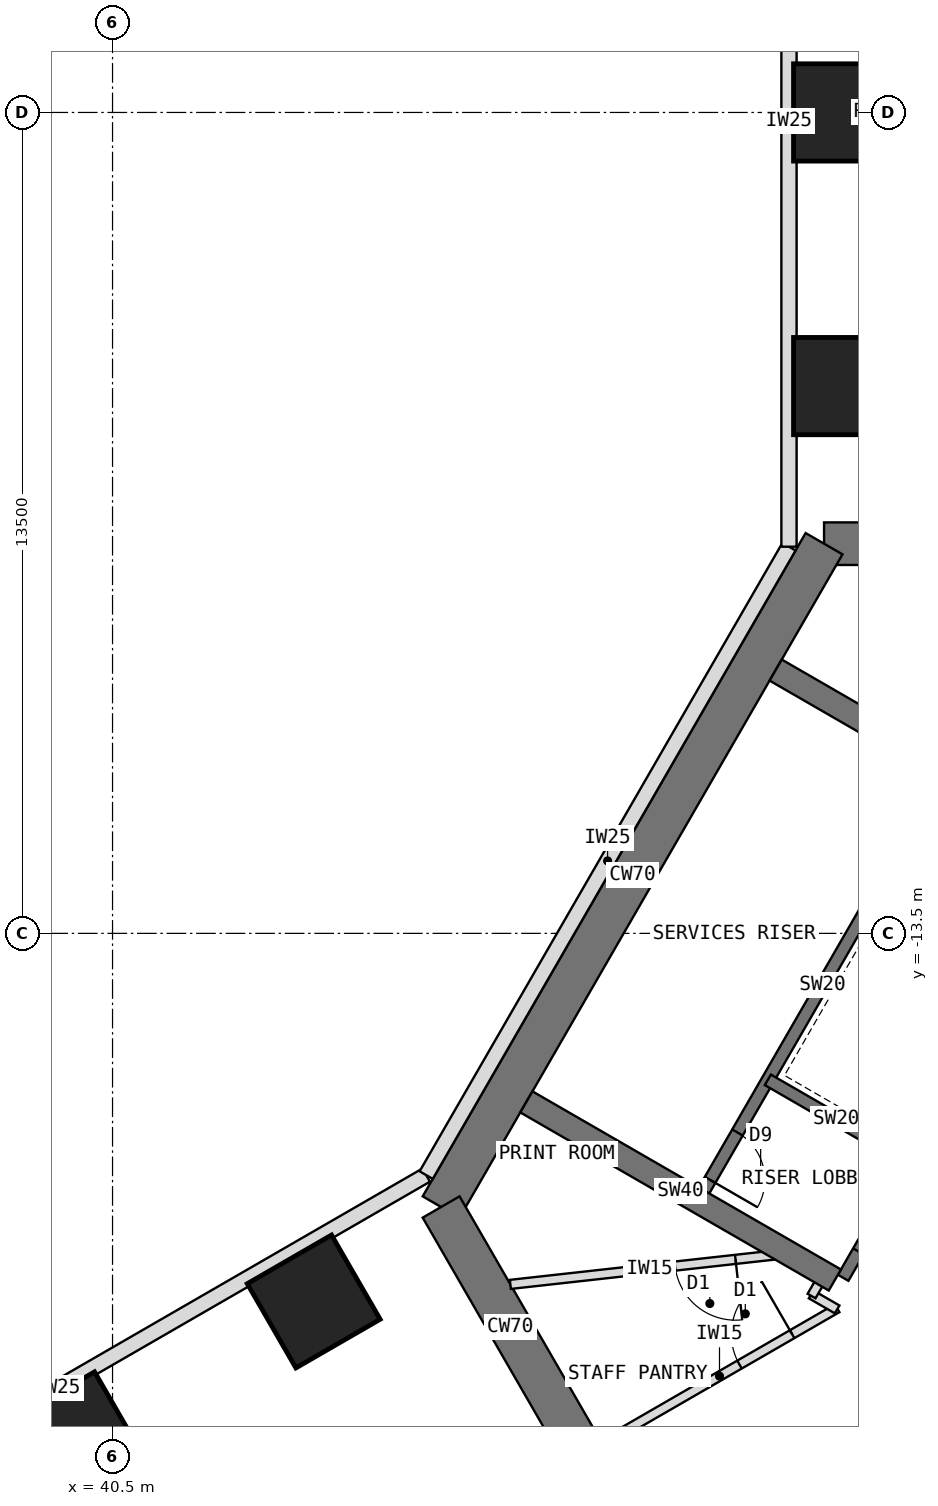
"""IFC4 building model, lengths in metres.
Left out: names, types, materials, properties, quantities, classifications, styles, units other than length and angle.
Written with IfcOpenShell. Run it as: python <this file> out.ifc"""

import sys

from ifc_helpers import new_model, si_unit, direction, frame, frame_2d, origin, origin_2d, place, context, subcontext, project, spatial, rectangle, extrude, element, fill, save


model = new_model("IFC4")
c1 = context("Model", 3, precision=1e-05, world=origin(), true_north=direction((0.0, 1.0)))
c2 = subcontext(c1, "Body", "Model", "MODEL_VIEW")
j1 = project(units=[si_unit("LENGTHUNIT", "METRE"), si_unit("PLANEANGLEUNIT", "RADIAN")], contexts=[c1])
p1 = place(None, origin())
s1 = spatial("IfcSite", under=j1, at=p1, CompositionType="ELEMENT")
p2 = place(p1, origin())
s2 = spatial("IfcBuilding", under=s1, at=p2, CompositionType="ELEMENT")
p3 = place(p2, frame((0.0, 0.0, 15.5)))
s3 = spatial("IfcBuildingStorey", under=s2, at=p3, CompositionType="ELEMENT", Elevation=15.5)
for number, where, z_axis, x_axis in (
    (1, (40.5, -13.5, 0.0), (0.0, 0.0, 1.0), (1.0, 0.0, 0.0)),
    (2, (40.5, 0.0, 0.0), (0.0, 0.0, 1.0), (1.0, 0.0, 0.0)),
):
    element("IfcColumn", number, at=place(p3, frame(where, z_axis=z_axis, x_axis=x_axis)), inside=s3, PredefinedType="COLUMN", context=c2, shape_type="SweptSolid", body=[
        extrude(rectangle(XDim=1.5, YDim=1.5, at=origin_2d()), origin(), (0.0, 0.0, 1.0), 5.0),
    ])
p4 = place(p3, frame((56.75, -7.092, 0.0), z_axis=(0.0, 0.0, 1.0), x_axis=(-1.0, 0.0, 0.0)))
e3 = element("IfcWall", 3, at=p4, inside=s3, PredefinedType="SHEAR", context=c2, shape_type="SweptSolid", body=[
    extrude(rectangle(XDim=4.548, YDim=0.7, at=frame_2d((2.274, 0.0))), origin(), (0.0, 0.0, 1.0), 5.0),
])
p5 = place(p3, frame((52.202, -7.092, 0.0), z_axis=(0.0, 0.0, 1.0), x_axis=(-0.500005998175, -0.866021940709, 0.0)))
e4 = element("IfcWall", 4, at=p5, inside=s3, PredefinedType="SHEAR", context=c2, shape_type="SweptSolid", body=[
    extrude(rectangle(XDim=12.596, YDim=0.7, at=frame_2d((6.298, 0.0))), origin(), (0.0, 0.0, 1.0), 5.0),
])
p6 = place(p3, frame((45.904, -18.0, 0.0), z_axis=(0.0, 0.0, 1.0), x_axis=(0.500024481964, -0.866011268655, 0.0)))
e5 = element("IfcWall", 5, at=p6, inside=s3, PredefinedType="SHEAR", context=c2, shape_type="SweptSolid", body=[
    extrude(rectangle(XDim=4.548, YDim=0.7, at=frame_2d((2.274, 0.0))), origin(), (0.0, 0.0, 1.0), 5.0),
])
for number, where, z_axis, x_axis in (
    (6, (52.5, -4.5, 0.0), (0.0, 0.0, 1.0), (1.0, 0.0, 0.0)),
    (7, (52.5, 0.0, 0.0), (0.0, 0.0, 1.0), (1.0, 0.0, 0.0)),
    (8, (43.809, -19.554, 0.0), (0.0, 0.0, 1.0), (0.866, 0.5, 0.0)),
    (9, (39.912, -21.804, 0.0), (0.0, 0.0, 1.0), (0.866, 0.5, 0.0)),
):
    element("IfcColumn", number, at=place(p3, frame(where, z_axis=z_axis, x_axis=x_axis)), inside=s3, PredefinedType="COLUMN", context=c2, shape_type="SweptSolid", body=[
        extrude(rectangle(XDim=1.6, YDim=1.6, at=origin_2d()), origin(), (0.0, 0.0, 1.0), 5.0),
    ])
p7 = place(p3, frame((56.516, -12.236, 0.0), z_axis=(0.0, 0.0, 1.0), x_axis=(-0.49999894854, -0.866026010844, 0.0)))
e10 = element("IfcWall", 10, at=p7, inside=s3, PredefinedType="SHEAR", context=c2, shape_type="SweptSolid", body=[
    extrude(rectangle(XDim=8.0, YDim=0.2, at=frame_2d((4.0, 0.0))), origin(), (0.0, 0.0, 1.0), 5.0),
])
p8 = place(p7, frame((6.3, 0.0, 0.0)))
e11 = element("IfcOpeningElement", 11, at=p8, cuts=e10, PredefinedType="OPENING", context=c2, shape_type="SweptSolid", body=[
    extrude(rectangle(XDim=1.2, YDim=2.1, at=frame_2d((0.6, 1.05))), frame((0.0, 0.11, 0.0), z_axis=(0.0, -1.0, 0.0), x_axis=(1.0, 0.0, 0.0)), (0.0, 0.0, 1.0), 0.22),
])
for number, where, z_axis, x_axis in (
    (12, (54.98, -14.697, 0.0), (0.0, 0.0, 1.0), (-0.866, 0.5, 0.0)),
    (13, (53.53, -17.209, 0.0), (0.0, 0.0, 1.0), (-0.866, 0.5, 0.0)),
):
    element("IfcWall", number, at=place(p3, frame(where, z_axis=z_axis, x_axis=x_axis)), inside=s3, PredefinedType="SHEAR", context=c2, shape_type="SweptSolid", body=[
        extrude(rectangle(XDim=2.6, YDim=0.2, at=frame_2d((1.3, 0.0))), origin(), (0.0, 0.0, 1.0), 5.0),
    ])
p9 = place(p3, frame((54.178, -10.886, 0.0), z_axis=(0.0, 0.0, 1.0), x_axis=(-0.49999894854, -0.866026010844, 0.0)))
e14 = element("IfcWall", 14, at=p9, inside=s3, PredefinedType="SHEAR", context=c2, shape_type="SweptSolid", body=[
    extrude(rectangle(XDim=8.0, YDim=0.2, at=frame_2d((4.0, 0.0))), origin(), (0.0, 0.0, 1.0), 5.0),
])
p10 = place(p9, frame((6.8, 0.0, 0.0)))
e15 = element("IfcOpeningElement", 15, at=p10, cuts=e14, PredefinedType="OPENING", context=c2, shape_type="SweptSolid", body=[
    extrude(rectangle(XDim=0.9, YDim=2.1, at=frame_2d((0.45, 1.05))), frame((0.0, 0.11, 0.0), z_axis=(0.0, -1.0, 0.0), x_axis=(1.0, 0.0, 0.0)), (0.0, 0.0, 1.0), 0.22),
])
for number, where, z_axis, x_axis in (
    (16, (52.38, -19.201, 0.0), (0.0, 0.0, 1.0), (-0.866, 0.5, 0.0)),
    (17, (56.48, -12.099, 0.0), (0.0, 0.0, 1.0), (-0.866, 0.5, 0.0)),
):
    element("IfcWall", number, at=place(p3, frame(where, z_axis=z_axis, x_axis=x_axis)), inside=s3, PredefinedType="SHEAR", context=c2, shape_type="SweptSolid", body=[
        extrude(rectangle(XDim=5.858, YDim=0.4, at=frame_2d((2.929, 0.0))), origin(), (0.0, 0.0, 1.0), 5.0),
    ])
p11 = place(p3, frame((48.548, -21.898, 0.0), z_axis=(0.0, 0.0, 1.0), x_axis=(0.866025445582, 0.499999927604, 0.0)))
e18 = element("IfcWall", 18, at=p11, inside=s3, PredefinedType="PARTITIONING", context=c2, shape_type="SweptSolid", body=[
    extrude(rectangle(XDim=4.468, YDim=0.15, at=frame_2d((2.234, 0.0))), origin(), (0.0, 0.0, 1.0), 4.8),
])
p12 = place(p11, frame((2.614, 0.0, 0.0)))
e19 = element("IfcOpeningElement", 19, at=p12, cuts=e18, PredefinedType="OPENING", context=c2, shape_type="SweptSolid", body=[
    extrude(rectangle(XDim=1.0, YDim=2.1, at=frame_2d((0.5, 1.05))), frame((0.0, 0.085, 0.0), z_axis=(0.0, -1.0, 0.0), x_axis=(1.0, 0.0, 0.0)), (0.0, 0.0, 1.0), 0.17),
])
p13 = place(p3, frame((52.417, -19.684, 0.0), z_axis=(0.0, 0.0, 1.0), x_axis=(-0.865831790172, 0.50033519877, 0.0)))
e20 = element("IfcWall", 20, at=p13, inside=s3, PredefinedType="PARTITIONING", context=c2, shape_type="SweptSolid", body=[
    extrude(rectangle(XDim=0.494, YDim=0.15, at=frame_2d((0.247, 0.0))), origin(), (0.0, 0.0, 1.0), 4.8),
])
p14 = place(p3, frame((51.997, -19.464, 0.0), z_axis=(0.0, 0.0, 1.0), x_axis=(0.499804398801, 0.866138304741, 0.0)))
e21 = element("IfcWall", 21, at=p14, inside=s3, PredefinedType="PARTITIONING", context=c2, shape_type="SweptSolid", body=[
    extrude(rectangle(XDim=0.43, YDim=0.15, at=frame_2d((0.215, 0.0))), origin(), (0.0, 0.0, 1.0), 4.8),
])
p15 = place(p3, frame((51.623, -18.764, 0.0), z_axis=(0.0, 0.0, 1.0), x_axis=(-0.993886318744, -0.110408266965, 0.0)))
e22 = element("IfcWall", 22, at=p15, inside=s3, PredefinedType="PARTITIONING", context=c2, shape_type="SweptSolid", body=[
    extrude(rectangle(XDim=4.608, YDim=0.15, at=frame_2d((2.304, 0.0))), origin(), (0.0, 0.0, 1.0), 4.8),
])
p16 = place(p15, frame((0.883, 0.0, 0.0)))
e23 = element("IfcOpeningElement", 23, at=p16, cuts=e22, PredefinedType="OPENING", context=c2, shape_type="SweptSolid", body=[
    extrude(rectangle(XDim=1.0, YDim=2.1, at=frame_2d((0.5, 1.05))), frame((0.0, 0.085, 0.0), z_axis=(0.0, -1.0, 0.0), x_axis=(1.0, 0.0, 0.0)), (0.0, 0.0, 1.0), 0.17),
])
p17 = place(p3, frame((40.5, -20.252, 0.0), z_axis=(0.0, 0.0, 1.0), x_axis=(0.0, 1.0, 0.0)))
e24 = element("IfcWall", 24, at=p17, inside=s3, PredefinedType="PARTITIONING", context=c2, shape_type="SweptSolid", body=[
    extrude(rectangle(XDim=6.752, YDim=0.2, at=frame_2d((3.376, 0.0))), origin(), (0.0, 0.0, 1.0), 4.65),
])
p18 = place(p17, frame((2.476, 0.0, 0.0)))
e25 = element("IfcOpeningElement", 25, at=p18, cuts=e24, PredefinedType="OPENING", context=c2, shape_type="SweptSolid", body=[
    extrude(rectangle(XDim=1.8, YDim=2.4, at=frame_2d((0.9, 1.2))), frame((0.0, 0.11, 0.0), z_axis=(0.0, -1.0, 0.0), x_axis=(1.0, 0.0, 0.0)), (0.0, 0.0, 1.0), 0.22),
])
p19 = place(p3, frame((27.0, -13.5, 0.0), z_axis=(0.0, 0.0, 1.0), x_axis=(1.0, 0.0, 0.0)))
e26 = element("IfcWall", 26, at=p19, inside=s3, PredefinedType="PARTITIONING", context=c2, shape_type="SweptSolid", body=[
    extrude(rectangle(XDim=13.5, YDim=0.2, at=frame_2d((6.75, 0.0))), origin(), (0.0, 0.0, 1.0), 3.25),
])
p20 = place(p19, frame((5.85, 0.0, 0.0)))
e27 = element("IfcOpeningElement", 27, at=p20, cuts=e26, PredefinedType="OPENING", context=c2, shape_type="SweptSolid", body=[
    extrude(rectangle(XDim=1.8, YDim=2.4, at=frame_2d((0.9, 1.2))), frame((0.0, 0.11, 0.0), z_axis=(0.0, -1.0, 0.0), x_axis=(1.0, 0.0, 0.0)), (0.0, 0.0, 1.0), 0.22),
])
p21 = place(p3, frame((40.5, -13.5, 0.0), z_axis=(0.0, 0.0, 1.0), x_axis=(0.0, 1.0, 0.0)))
e28 = element("IfcWall", 28, at=p21, inside=s3, PredefinedType="PARTITIONING", context=c2, shape_type="SweptSolid", body=[
    extrude(rectangle(XDim=13.5, YDim=0.2, at=frame_2d((6.75, 0.0))), origin(), (0.0, 0.0, 1.0), 3.25),
])
p22 = place(p21, frame((5.85, 0.0, 0.0)))
e29 = element("IfcOpeningElement", 29, at=p22, cuts=e28, PredefinedType="OPENING", context=c2, shape_type="SweptSolid", body=[
    extrude(rectangle(XDim=1.8, YDim=2.4, at=frame_2d((0.9, 1.2))), frame((0.0, 0.11, 0.0), z_axis=(0.0, -1.0, 0.0), x_axis=(1.0, 0.0, 0.0)), (0.0, 0.0, 1.0), 0.22),
])
p23 = place(p3, frame((40.5, 0.0, 0.0), z_axis=(0.0, 0.0, 1.0), x_axis=(0.0, 1.0, 0.0)))
e30 = element("IfcWall", 30, at=p23, inside=s3, PredefinedType="PARTITIONING", context=c2, shape_type="SweptSolid", body=[
    extrude(rectangle(XDim=13.5, YDim=0.2, at=frame_2d((6.75, 0.0))), origin(), (0.0, 0.0, 1.0), 3.25),
])
p24 = place(p23, frame((5.85, 0.0, 0.0)))
e31 = element("IfcOpeningElement", 31, at=p24, cuts=e30, PredefinedType="OPENING", context=c2, shape_type="SweptSolid", body=[
    extrude(rectangle(XDim=1.8, YDim=2.4, at=frame_2d((0.9, 1.2))), frame((0.0, 0.11, 0.0), z_axis=(0.0, -1.0, 0.0), x_axis=(1.0, 0.0, 0.0)), (0.0, 0.0, 1.0), 0.22),
])
p25 = place(p3, frame((40.5, 0.0, 0.0), z_axis=(0.0, 0.0, 1.0), x_axis=(1.0, 0.0, 0.0)))
e32 = element("IfcWall", 32, at=p25, inside=s3, PredefinedType="PARTITIONING", context=c2, shape_type="SweptSolid", body=[
    extrude(rectangle(XDim=10.95, YDim=0.2, at=frame_2d((5.475, 0.0))), origin(), (0.0, 0.0, 1.0), 4.65),
])
p26 = place(p25, frame((4.575, 0.0, 0.0)))
e33 = element("IfcOpeningElement", 33, at=p26, cuts=e32, PredefinedType="OPENING", context=c2, shape_type="SweptSolid", body=[
    extrude(rectangle(XDim=1.8, YDim=2.4, at=frame_2d((0.9, 1.2))), frame((0.0, 0.11, 0.0), z_axis=(0.0, -1.0, 0.0), x_axis=(1.0, 0.0, 0.0)), (0.0, 0.0, 1.0), 0.22),
])
p27 = place(p3, frame((33.52, -24.484, 0.0), z_axis=(0.0, 0.0, 1.0), x_axis=(0.866027500821, 0.499996367808, 0.0)))
e34 = element("IfcWall", 34, at=p27, inside=s3, PredefinedType="STANDARD", context=c2, shape_type="SweptSolid", body=[
    extrude(rectangle(XDim=14.016, YDim=0.25, at=frame_2d((7.008, 0.0))), origin(), (0.0, 0.0, 1.0), 4.65),
])
p28 = place(p3, frame((45.658, -17.476, 0.0), z_axis=(0.0, 0.0, 1.0), x_axis=(0.499996365031, 0.866027502425, 0.0)))
e35 = element("IfcWall", 35, at=p28, inside=s3, PredefinedType="STANDARD", context=c2, shape_type="SweptSolid", body=[
    extrude(rectangle(XDim=11.933, YDim=0.25, at=frame_2d((5.967, 0.0))), origin(), (0.0, 0.0, 1.0), 4.65),
])
p29 = place(p3, frame((51.625, -7.141, 0.0), z_axis=(0.0, 0.0, 1.0), x_axis=(0.0, 1.0, 0.0)))
e36 = element("IfcWall", 36, at=p29, inside=s3, PredefinedType="STANDARD", context=c2, shape_type="SweptSolid", body=[
    extrude(rectangle(XDim=14.016, YDim=0.25, at=frame_2d((7.008, 0.0))), origin(), (0.0, 0.0, 1.0), 4.65),
])
p30 = place(p8, origin())
e37 = element("IfcDoor", 37, at=p30, inside=s3, OperationType="SINGLE_SWING_RIGHT", PredefinedType="DOOR", context=c2, shape_type="SweptSolid", body=[
    extrude(rectangle(XDim=1.2, YDim=2.1, at=frame_2d((0.6, 1.05))), frame((0.0, 0.025, 0.0), z_axis=(0.0, -1.0, 0.0), x_axis=(1.0, 0.0, 0.0)), (0.0, 0.0, 1.0), 0.05),
])
fill(e11, e37)
p31 = place(p10, origin())
e38 = element("IfcDoor", 38, at=p31, inside=s3, OperationType="SINGLE_SWING_RIGHT", PredefinedType="DOOR", context=c2, shape_type="SweptSolid", body=[
    extrude(rectangle(XDim=0.9, YDim=2.1, at=frame_2d((0.45, 1.05))), frame((0.0, 0.025, 0.0), z_axis=(0.0, -1.0, 0.0), x_axis=(1.0, 0.0, 0.0)), (0.0, 0.0, 1.0), 0.05),
])
fill(e15, e38)
p32 = place(p16, origin())
e39 = element("IfcDoor", 39, at=p32, inside=s3, OperationType="SINGLE_SWING_LEFT", PredefinedType="DOOR", context=c2, shape_type="SweptSolid", body=[
    extrude(rectangle(XDim=1.0, YDim=2.1, at=frame_2d((0.5, 1.05))), frame((0.0, 0.025, 0.0), z_axis=(0.0, -1.0, 0.0), x_axis=(1.0, 0.0, 0.0)), (0.0, 0.0, 1.0), 0.05),
])
fill(e23, e39)
p33 = place(p12, origin())
e40 = element("IfcDoor", 40, at=p33, inside=s3, OperationType="SINGLE_SWING_RIGHT", PredefinedType="DOOR", context=c2, shape_type="SweptSolid", body=[
    extrude(rectangle(XDim=1.0, YDim=2.1, at=frame_2d((0.5, 1.05))), frame((0.0, 0.025, 0.0), z_axis=(0.0, -1.0, 0.0), x_axis=(1.0, 0.0, 0.0)), (0.0, 0.0, 1.0), 0.05),
])
fill(e19, e40)
p34 = place(p18, origin())
e41 = element("IfcDoor", 41, at=p34, inside=s3, OperationType="DOUBLE_DOOR_DOUBLE_SWING", PredefinedType="DOOR", context=c2, shape_type="SweptSolid", body=[
    extrude(rectangle(XDim=1.8, YDim=2.4, at=frame_2d((0.9, 1.2))), frame((0.0, 0.025, 0.0), z_axis=(0.0, -1.0, 0.0), x_axis=(1.0, 0.0, 0.0)), (0.0, 0.0, 1.0), 0.05),
])
fill(e25, e41)
p35 = place(p26, origin())
e42 = element("IfcDoor", 42, at=p35, inside=s3, OperationType="DOUBLE_DOOR_DOUBLE_SWING", PredefinedType="DOOR", context=c2, shape_type="SweptSolid", body=[
    extrude(rectangle(XDim=1.8, YDim=2.4, at=frame_2d((0.9, 1.2))), frame((0.0, 0.025, 0.0), z_axis=(0.0, -1.0, 0.0), x_axis=(1.0, 0.0, 0.0)), (0.0, 0.0, 1.0), 0.05),
])
fill(e33, e42)
p36 = place(p22, origin())
e43 = element("IfcDoor", 43, at=p36, inside=s3, OperationType="DOUBLE_DOOR_DOUBLE_SWING", PredefinedType="DOOR", context=c2, shape_type="SweptSolid", body=[
    extrude(rectangle(XDim=1.8, YDim=2.4, at=frame_2d((0.9, 1.2))), frame((0.0, 0.025, 0.0), z_axis=(0.0, -1.0, 0.0), x_axis=(1.0, 0.0, 0.0)), (0.0, 0.0, 1.0), 0.05),
])
fill(e29, e43)
save(model, sys.argv[1])
